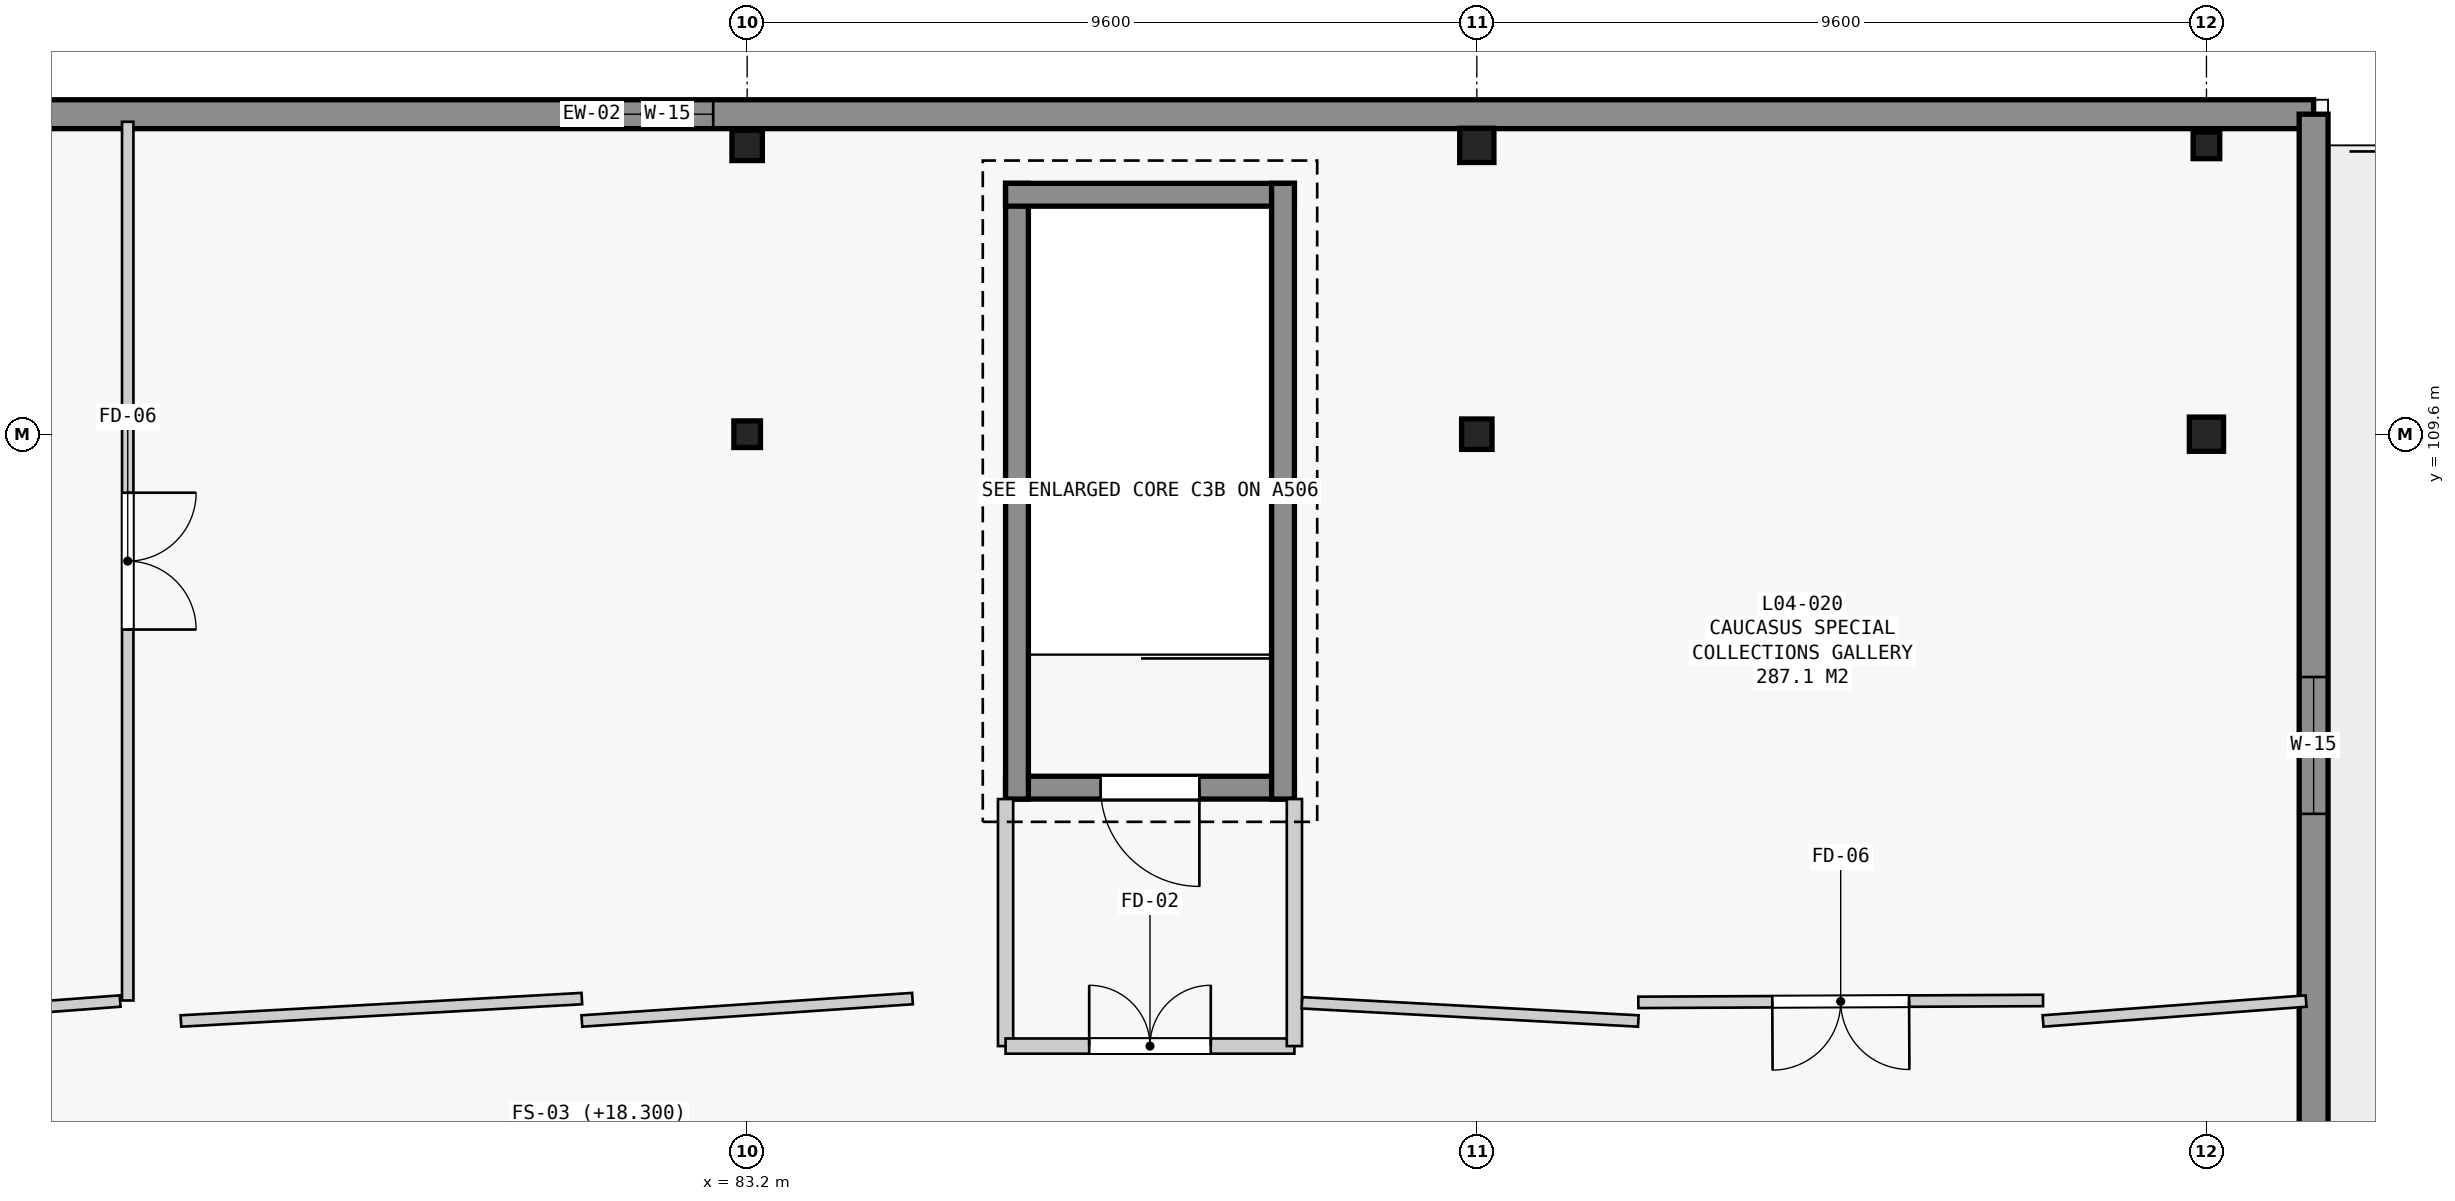
"""IFC4 building model, lengths in metres.
Left out: names, types, materials, properties, quantities, classifications, styles, units other than length and angle.
Written with IfcOpenShell. Run it as: python <this file> out.ifc"""

import sys

from ifc_helpers import new_model, si_unit, direction, frame, frame_2d, origin, origin_2d, place, context, subcontext, project, spatial, rectangle, extrude, element, fill, save


model = new_model("IFC4")
c1 = context("Model", 3, precision=1e-05, world=origin(), true_north=direction((0.0, 1.0)))
c2 = subcontext(c1, "Body", "Model", "MODEL_VIEW")
j1 = project(units=[si_unit("LENGTHUNIT", "METRE"), si_unit("PLANEANGLEUNIT", "RADIAN")], contexts=[c1])
p1 = place(None, origin())
s1 = spatial("IfcSite", under=j1, at=p1, CompositionType="ELEMENT")
p2 = place(p1, origin())
s2 = spatial("IfcBuilding", under=s1, at=p2, CompositionType="ELEMENT")
p3 = place(p2, frame((0.0, 0.0, 18.3)))
s3 = spatial("IfcBuildingStorey", under=s2, at=p3, CompositionType="ELEMENT", Elevation=18.3)
p4 = place(p3, frame((83.2, 109.6, 0.0), z_axis=(0.0, 0.0, 1.0), x_axis=(1.0, 0.0, 0.0)))
e1 = element("IfcColumn", 1, at=p4, inside=s3, PredefinedType="COLUMN", context=c2, shape_type="SweptSolid", body=[
    extrude(rectangle(XDim=0.35, YDim=0.35, at=origin_2d()), origin(), (0.0, 0.0, 1.0), 4.2),
])
for number, where, z_axis, x_axis in (
    (2, (83.2, 113.4, 0.0), (0.0, 0.0, 1.0), (1.0, 0.0, 0.0)),
    (3, (92.8, 109.6, 0.0), (0.0, 0.0, 1.0), (1.0, 0.0, 0.0)),
):
    element("IfcColumn", number, at=place(p3, frame(where, z_axis=z_axis, x_axis=x_axis)), inside=s3, PredefinedType="COLUMN", context=c2, shape_type="SweptSolid", body=[
        extrude(rectangle(XDim=0.4, YDim=0.4, at=origin_2d()), origin(), (0.0, 0.0, 1.0), 4.2),
    ])
for number, where, z_axis, x_axis in (
    (4, (92.8, 113.4, 0.0), (0.0, 0.0, 1.0), (1.0, 0.0, 0.0)),
    (5, (102.4, 109.6, 0.0), (0.0, 0.0, 1.0), (1.0, 0.0, 0.0)),
):
    element("IfcColumn", number, at=place(p3, frame(where, z_axis=z_axis, x_axis=x_axis)), inside=s3, PredefinedType="COLUMN", context=c2, shape_type="SweptSolid", body=[
        extrude(rectangle(XDim=0.45, YDim=0.45, at=origin_2d()), origin(), (0.0, 0.0, 1.0), 4.2),
    ])
p5 = place(p3, frame((102.4, 113.4, 0.0), z_axis=(0.0, 0.0, 1.0), x_axis=(1.0, 0.0, 0.0)))
e6 = element("IfcColumn", 6, at=p5, inside=s3, PredefinedType="COLUMN", context=c2, shape_type="SweptSolid", body=[
    extrude(rectangle(XDim=0.35, YDim=0.35, at=origin_2d()), origin(), (0.0, 0.0, 1.0), 4.2),
])
p6 = place(p3, frame((46.29, 113.81, 0.0), z_axis=(0.0, 0.0, 1.0), x_axis=(1.0, 0.0, 0.0)))
e7 = element("IfcWall", 7, at=p6, inside=s3, PredefinedType="STANDARD", context=c2, shape_type="SweptSolid", body=[
    extrude(rectangle(XDim=57.52, YDim=0.38, at=frame_2d((28.76, 0.0))), origin(), (0.0, 0.0, 1.0), 3.94),
])
p7 = place(p6, frame((18.732, 0.0, 1.05)))
e8 = element("IfcOpeningElement", 8, at=p7, cuts=e7, PredefinedType="OPENING", context=c2, shape_type="SweptSolid", body=[
    extrude(rectangle(XDim=1.65, YDim=2.2, at=frame_2d((0.825, 1.1))), frame((0.0, 0.2, 0.0), z_axis=(0.0, -1.0, 0.0), x_axis=(1.0, 0.0, 0.0)), (0.0, 0.0, 1.0), 0.4),
])
p8 = place(p6, frame((34.663, 0.0, 1.05)))
e9 = element("IfcOpeningElement", 9, at=p8, cuts=e7, PredefinedType="OPENING", context=c2, shape_type="SweptSolid", body=[
    extrude(rectangle(XDim=1.8, YDim=2.5, at=frame_2d((0.9, 1.25))), frame((0.0, 0.2, 0.0), z_axis=(0.0, -1.0, 0.0), x_axis=(1.0, 0.0, 0.0)), (0.0, 0.0, 1.0), 0.4),
])
p9 = place(p3, frame((103.81, 113.81, 0.0), z_axis=(0.0, 0.0, 1.0), x_axis=(0.0, -1.0, 0.0)))
e10 = element("IfcWall", 10, at=p9, inside=s3, PredefinedType="STANDARD", context=c2, shape_type="SweptSolid", body=[
    extrude(rectangle(XDim=20.586, YDim=0.38, at=frame_2d((10.293, 0.0))), origin(), (0.0, 0.0, 1.0), 3.94),
])
p10 = place(p9, frame((14.985, 0.0, 0.0)))
e11 = element("IfcOpeningElement", 11, at=p10, cuts=e10, PredefinedType="OPENING", context=c2, shape_type="SweptSolid", body=[
    extrude(rectangle(XDim=1.65, YDim=2.3, at=frame_2d((0.825, 1.15))), frame((0.0, 0.2, 0.0), z_axis=(0.0, -1.0, 0.0), x_axis=(1.0, 0.0, 0.0)), (0.0, 0.0, 1.0), 0.4),
])
p11 = place(p9, frame((7.405, 0.0, 1.05)))
e12 = element("IfcOpeningElement", 12, at=p11, cuts=e10, PredefinedType="OPENING", context=c2, shape_type="SweptSolid", body=[
    extrude(rectangle(XDim=1.8, YDim=2.5, at=frame_2d((0.9, 1.25))), frame((0.0, 0.2, 0.0), z_axis=(0.0, -1.0, 0.0), x_axis=(1.0, 0.0, 0.0)), (0.0, 0.0, 1.0), 0.4),
])
p12 = place(p3, frame((90.4, 104.95, 0.0), z_axis=(0.0, 0.0, 1.0), x_axis=(-1.0, 0.0, 0.0)))
e13 = element("IfcWall", 13, at=p12, inside=s3, PredefinedType="SHEAR", context=c2, shape_type="SweptSolid", body=[
    extrude(rectangle(XDim=3.8, YDim=0.3, at=frame_2d((1.9, 0.0))), origin(), (0.0, 0.0, 1.0), 4.2),
])
p13 = place(p12, frame((1.25, 0.0, 0.0)))
e14 = element("IfcOpeningElement", 14, at=p13, cuts=e13, PredefinedType="OPENING", context=c2, shape_type="SweptSolid", body=[
    extrude(rectangle(XDim=1.3, YDim=2.2, at=frame_2d((0.65, 1.1))), frame((0.0, 0.16, 0.0), z_axis=(0.0, -1.0, 0.0), x_axis=(1.0, 0.0, 0.0)), (0.0, 0.0, 1.0), 0.32),
])
p14 = place(p3, frame((86.75, 104.8, 0.0), z_axis=(0.0, 0.0, 1.0), x_axis=(0.0, 1.0, 0.0)))
e15 = element("IfcWall", 15, at=p14, inside=s3, PredefinedType="SHEAR", context=c2, shape_type="SweptSolid", body=[
    extrude(rectangle(XDim=8.1, YDim=0.3, at=frame_2d((4.05, 0.0))), origin(), (0.0, 0.0, 1.0), 4.2),
])
p15 = place(p3, frame((86.6, 112.75, 0.0), z_axis=(0.0, 0.0, 1.0), x_axis=(1.0, 0.0, 0.0)))
e16 = element("IfcWall", 16, at=p15, inside=s3, PredefinedType="SHEAR", context=c2, shape_type="SweptSolid", body=[
    extrude(rectangle(XDim=3.8, YDim=0.3, at=frame_2d((1.9, 0.0))), origin(), (0.0, 0.0, 1.0), 4.2),
])
p16 = place(p3, frame((90.25, 112.9, 0.0), z_axis=(0.0, 0.0, 1.0), x_axis=(0.0, -1.0, 0.0)))
e17 = element("IfcWall", 17, at=p16, inside=s3, PredefinedType="SHEAR", context=c2, shape_type="SweptSolid", body=[
    extrude(rectangle(XDim=8.1, YDim=0.3, at=frame_2d((4.05, 0.0))), origin(), (0.0, 0.0, 1.0), 4.2),
])
p17 = place(p3, frame((86.6, 104.8, 0.0), z_axis=(0.0, 0.0, 1.0), x_axis=(0.0, -1.0, 0.0)))
e18 = element("IfcWall", 18, at=p17, inside=s3, PredefinedType="STANDARD", context=c2, shape_type="SweptSolid", body=[
    extrude(rectangle(XDim=3.25, YDim=0.2, at=frame_2d((1.625, 0.0))), origin(), (0.0, 0.0, 1.0), 4.2),
])
p18 = place(p3, frame((86.6, 101.55, 0.0), z_axis=(0.0, 0.0, 1.0), x_axis=(1.0, 0.0, 0.0)))
e19 = element("IfcWall", 19, at=p18, inside=s3, PredefinedType="STANDARD", context=c2, shape_type="SweptSolid", body=[
    extrude(rectangle(XDim=3.8, YDim=0.2, at=frame_2d((1.9, 0.0))), origin(), (0.0, 0.0, 1.0), 4.2),
])
p19 = place(p18, frame((1.1, 0.0, 0.0)))
e20 = element("IfcOpeningElement", 20, at=p19, cuts=e19, PredefinedType="OPENING", context=c2, shape_type="SweptSolid", body=[
    extrude(rectangle(XDim=1.6, YDim=2.2, at=frame_2d((0.8, 1.1))), frame((0.0, 0.11, 0.0), z_axis=(0.0, -1.0, 0.0), x_axis=(1.0, 0.0, 0.0)), (0.0, 0.0, 1.0), 0.22),
])
p20 = place(p3, frame((90.4, 101.55, 0.0), z_axis=(0.0, 0.0, 1.0), x_axis=(0.0, 1.0, 0.0)))
e21 = element("IfcWall", 21, at=p20, inside=s3, PredefinedType="STANDARD", context=c2, shape_type="SweptSolid", body=[
    extrude(rectangle(XDim=3.25, YDim=0.2, at=frame_2d((1.625, 0.0))), origin(), (0.0, 0.0, 1.0), 4.2),
])
p21 = place(p3, frame((75.05, 113.71, 0.0), z_axis=(0.0, 0.0, 1.0), x_axis=(0.0, -1.0, 0.0)))
e22 = element("IfcWall", 22, at=p21, inside=s3, PredefinedType="PARTITIONING", context=c2, shape_type="SweptSolid", body=[
    extrude(rectangle(XDim=11.56, YDim=0.15, at=frame_2d((5.78, 0.0))), origin(), (0.0, 0.0, 1.0), 3.94),
])
p22 = place(p21, frame((4.88, 0.0, 0.0)))
e23 = element("IfcOpeningElement", 23, at=p22, cuts=e22, PredefinedType="OPENING", context=c2, shape_type="SweptSolid", body=[
    extrude(rectangle(XDim=1.8, YDim=2.2, at=frame_2d((0.9, 1.1))), frame((0.0, 0.085, 0.0), z_axis=(0.0, -1.0, 0.0), x_axis=(1.0, 0.0, 0.0)), (0.0, 0.0, 1.0), 0.17),
])
p23 = place(p3, frame((74.95, 102.143, 0.0), z_axis=(0.0, 0.0, 1.0), x_axis=(-0.997195547784, -0.074840092726, 0.0)))
e24 = element("IfcWall", 24, at=p23, inside=s3, PredefinedType="PARTITIONING", context=c2, shape_type="SweptSolid", body=[
    extrude(rectangle(XDim=3.51, YDim=0.15, at=frame_2d((1.755, 0.0))), origin(), (0.0, 0.0, 1.0), 3.94),
])
p24 = place(p3, frame((100.25, 102.15, 0.0), z_axis=(0.0, 0.0, 1.0), x_axis=(-0.999989065169, -0.004676488224, 0.0)))
e25 = element("IfcWall", 25, at=p24, inside=s3, PredefinedType="PARTITIONING", context=c2, shape_type="SweptSolid", body=[
    extrude(rectangle(XDim=5.325, YDim=0.15, at=frame_2d((2.663, 0.0))), origin(), (0.0, 0.0, 1.0), 3.42),
])
p25 = place(p24, frame((1.762, 0.0, 0.0)))
e26 = element("IfcOpeningElement", 26, at=p25, cuts=e25, PredefinedType="OPENING", context=c2, shape_type="SweptSolid", body=[
    extrude(rectangle(XDim=1.8, YDim=2.2, at=frame_2d((0.9, 1.1))), frame((0.0, 0.085, 0.0), z_axis=(0.0, -1.0, 0.0), x_axis=(1.0, 0.0, 0.0)), (0.0, 0.0, 1.0), 0.17),
])
p26 = place(p3, frame((94.925, 101.88, 0.0), z_axis=(0.0, 0.0, 1.0), x_axis=(-0.998535524491, 0.054099966072, 0.0)))
e27 = element("IfcWall", 27, at=p26, inside=s3, PredefinedType="PARTITIONING", context=c2, shape_type="SweptSolid", body=[
    extrude(rectangle(XDim=4.432, YDim=0.15, at=frame_2d((2.216, 0.0))), origin(), (0.0, 0.0, 1.0), 3.22),
])
p27 = place(p3, frame((85.375, 102.175, 0.0), z_axis=(0.0, 0.0, 1.0), x_axis=(-0.997705921708, -0.067697073709, 0.0)))
e28 = element("IfcWall", 28, at=p27, inside=s3, PredefinedType="PARTITIONING", context=c2, shape_type="SweptSolid", body=[
    extrude(rectangle(XDim=4.36, YDim=0.15, at=frame_2d((2.18, 0.0))), origin(), (0.0, 0.0, 1.0), 3.94),
])
p28 = place(p3, frame((81.025, 102.175, 0.0), z_axis=(0.0, 0.0, 1.0), x_axis=(-0.998438092025, -0.055869279518, 0.0)))
e29 = element("IfcWall", 29, at=p28, inside=s3, PredefinedType="PARTITIONING", context=c2, shape_type="SweptSolid", body=[
    extrude(rectangle(XDim=5.283, YDim=0.15, at=frame_2d((2.642, 0.0))), origin(), (0.0, 0.0, 1.0), 3.94),
])
p29 = place(p3, frame((103.71, 102.142, 0.0), z_axis=(0.0, 0.0, 1.0), x_axis=(-0.997135858871, -0.075631203576, 0.0)))
e30 = element("IfcWall", 30, at=p29, inside=s3, PredefinedType="PARTITIONING", context=c2, shape_type="SweptSolid", body=[
    extrude(rectangle(XDim=3.47, YDim=0.15, at=frame_2d((1.735, 0.0))), origin(), (0.0, 0.0, 1.0), 3.22),
])
p30 = place(p8, origin())
e31 = element("IfcWindow", 31, at=p30, inside=s3, PartitioningType="SINGLE_PANEL", PredefinedType="WINDOW", context=c2, shape_type="SweptSolid", body=[
    extrude(rectangle(XDim=1.8, YDim=2.5, at=frame_2d((0.9, 1.25))), frame((0.0, 0.03, 0.0), z_axis=(0.0, -1.0, 0.0), x_axis=(1.0, 0.0, 0.0)), (0.0, 0.0, 1.0), 0.06),
])
fill(e9, e31)
p31 = place(p11, origin())
e32 = element("IfcWindow", 32, at=p31, inside=s3, PartitioningType="SINGLE_PANEL", PredefinedType="WINDOW", context=c2, shape_type="SweptSolid", body=[
    extrude(rectangle(XDim=1.8, YDim=2.5, at=frame_2d((0.9, 1.25))), frame((0.0, 0.03, 0.0), z_axis=(0.0, -1.0, 0.0), x_axis=(1.0, 0.0, 0.0)), (0.0, 0.0, 1.0), 0.06),
])
fill(e12, e32)
p32 = place(p13, origin())
e33 = element("IfcDoor", 33, at=p32, inside=s3, OperationType="SINGLE_SWING_LEFT", PredefinedType="DOOR", context=c2, shape_type="SweptSolid", body=[
    extrude(rectangle(XDim=1.3, YDim=2.2, at=frame_2d((0.65, 1.1))), frame((0.0, 0.025, 0.0), z_axis=(0.0, -1.0, 0.0), x_axis=(1.0, 0.0, 0.0)), (0.0, 0.0, 1.0), 0.05),
])
fill(e14, e33)
p33 = place(p19, origin())
e34 = element("IfcDoor", 34, at=p33, inside=s3, OperationType="DOUBLE_DOOR_SINGLE_SWING", PredefinedType="DOOR", context=c2, shape_type="SweptSolid", body=[
    extrude(rectangle(XDim=1.6, YDim=2.2, at=frame_2d((0.8, 1.1))), frame((0.0, 0.025, 0.0), z_axis=(0.0, -1.0, 0.0), x_axis=(1.0, 0.0, 0.0)), (0.0, 0.0, 1.0), 0.05),
])
fill(e20, e34)
p34 = place(p22, origin())
e35 = element("IfcDoor", 35, at=p34, inside=s3, OperationType="DOUBLE_DOOR_SINGLE_SWING", PredefinedType="DOOR", context=c2, shape_type="SweptSolid", body=[
    extrude(rectangle(XDim=1.8, YDim=2.2, at=frame_2d((0.9, 1.1))), frame((0.0, 0.025, 0.0), z_axis=(0.0, -1.0, 0.0), x_axis=(1.0, 0.0, 0.0)), (0.0, 0.0, 1.0), 0.05),
])
fill(e23, e35)
p35 = place(p25, origin())
e36 = element("IfcDoor", 36, at=p35, inside=s3, OperationType="DOUBLE_DOOR_SINGLE_SWING", PredefinedType="DOOR", context=c2, shape_type="SweptSolid", body=[
    extrude(rectangle(XDim=1.8, YDim=2.2, at=frame_2d((0.9, 1.1))), frame((0.0, 0.025, 0.0), z_axis=(0.0, -1.0, 0.0), x_axis=(1.0, 0.0, 0.0)), (0.0, 0.0, 1.0), 0.05),
])
fill(e26, e36)
save(model, sys.argv[1])
